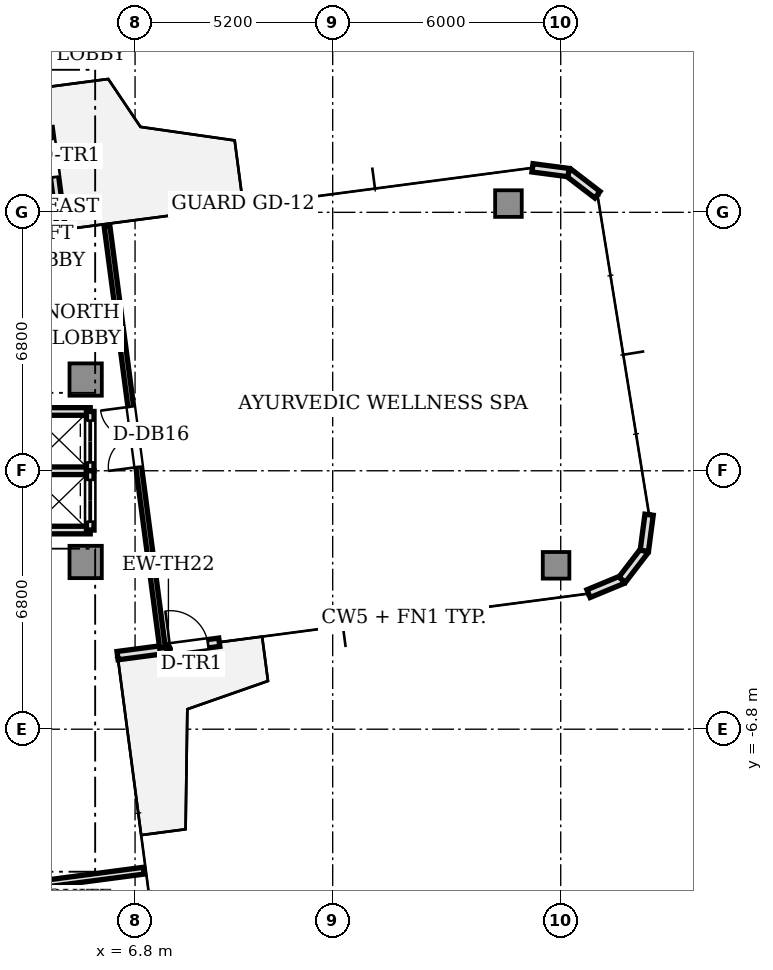
"""IFC4 building model, lengths in metres.
Left out: names, types, materials, properties, quantities, classifications, styles, units other than length and angle.
Written with IfcOpenShell. Run it as: python <this file> out.ifc"""

import sys

from ifc_helpers import new_model, si_unit, direction, frame, frame_2d, origin, origin_2d, place, context, subcontext, project, spatial, rectangle, extrude, source, transform, mapped, element, fill, save


model = new_model("IFC4")
c1 = context("Model", 3, precision=1e-05, world=origin(), true_north=direction((0.0, 1.0)))
c2 = subcontext(c1, "Body", "Model", "MODEL_VIEW")
j1 = project(units=[si_unit("LENGTHUNIT", "METRE"), si_unit("PLANEANGLEUNIT", "RADIAN")], contexts=[c1])
p1 = place(None, origin())
s1 = spatial("IfcSite", under=j1, at=p1, CompositionType="ELEMENT")
p2 = place(p1, origin())
s2 = spatial("IfcBuilding", under=s1, at=p2, CompositionType="ELEMENT")
p3 = place(p2, frame((0.0, 0.0, 213.2)))
s3 = spatial("IfcBuildingStorey", under=s2, at=p3, CompositionType="ELEMENT", Elevation=213.2)
m1 = source(origin(), c2, "Body", "SweptSolid", [
    extrude(rectangle(XDim=0.85, YDim=0.85, at=origin_2d()), origin(), (0.0, 0.0, 1.0), 3.11),
])
for number, where, z_axis, x_axis in (
    (1, (5.5, 2.4, 0.0), (0.0, 0.0, 1.0), (1.0, 0.0, 0.0)),
    (2, (5.5, -2.4, 0.0), (0.0, 0.0, 1.0), (1.0, 0.0, 0.0)),
):
    element("IfcColumn", number, at=place(p3, frame(where, z_axis=z_axis, x_axis=x_axis)), inside=s3, PredefinedType="COLUMN", context=c2, shape_type="MappedRepresentation", body=[
        mapped(m1, transform((0.0, 0.0, 0.0), scale=1.0)),
    ])
m2 = source(origin(), c2, "Body", "SweptSolid", [
    extrude(rectangle(XDim=0.7, YDim=0.7, at=origin_2d()), origin(), (0.0, 0.0, 1.0), 3.11),
])
for number, where, z_axis, x_axis in (
    (3, (17.878, -2.488, 0.0), (0.0, 0.0, 1.0), (1.0, 0.0, 0.0)),
    (4, (16.625, 7.03, 0.0), (0.0, 0.0, 1.0), (1.0, 0.0, 0.0)),
):
    element("IfcColumn", number, at=place(p3, frame(where, z_axis=z_axis, x_axis=x_axis)), inside=s3, PredefinedType="COLUMN", context=c2, shape_type="MappedRepresentation", body=[
        mapped(m2, transform((0.0, 0.0, 0.0), scale=1.0)),
    ])
p4 = place(p3, frame((6.339, -4.864, 0.0), z_axis=(0.0, 0.0, 1.0), x_axis=(0.991439824936, 0.130564442062, 0.0)))
e5 = element("IfcWall", 5, at=p4, inside=s3, PredefinedType="STANDARD", context=c2, shape_type="SweptSolid", body=[
    extrude(rectangle(XDim=2.7, YDim=0.22, at=frame_2d((1.35, 0.0))), origin(), (0.0, 0.0, 1.0), 3.11),
])
p5 = place(p4, frame((1.4, 0.0, 0.0)))
e6 = element("IfcOpeningElement", 6, at=p5, cuts=e5, PredefinedType="OPENING", context=c2, shape_type="SweptSolid", body=[
    extrude(rectangle(XDim=1.0, YDim=2.2, at=frame_2d((0.5, 1.1))), frame((0.0, 0.12, 0.0), z_axis=(0.0, -1.0, 0.0), x_axis=(1.0, 0.0, 0.0)), (0.0, 0.0, 1.0), 0.24),
])
for number, where, z_axis, x_axis in (
    (7, (18.732, -3.233, 0.0), (0.0, 0.0, 1.0), (0.924, 0.383, 0.0)),
    (8, (19.617, -2.866, 0.0), (0.0, 0.0, 1.0), (0.609, 0.793, 0.0)),
    (9, (20.2, -2.106, 0.0), (0.0, 0.0, 1.0), (0.131, 0.991, 0.0)),
):
    element("IfcWall", number, at=place(p3, frame(where, z_axis=z_axis, x_axis=x_axis)), inside=s3, PredefinedType="STANDARD", context=c2, shape_type="SweptSolid", body=[
        extrude(rectangle(XDim=0.958, YDim=0.22, at=frame_2d((0.479, 0.0))), origin(), (0.0, 0.0, 1.0), 3.11),
    ])
p6 = place(p3, frame((18.966, 7.263, 0.0), z_axis=(0.0, 0.0, 1.0), x_axis=(-0.793249178392, 0.608897151398, 0.0)))
e10 = element("IfcWall", 10, at=p6, inside=s3, PredefinedType="STANDARD", context=c2, shape_type="SweptSolid", body=[
    extrude(rectangle(XDim=0.958, YDim=0.22, at=frame_2d((0.479, 0.0))), origin(), (0.0, 0.0, 1.0), 3.11),
])
p7 = place(p3, frame((18.207, 7.846, 0.0), z_axis=(0.0, 0.0, 1.0), x_axis=(-0.991444747987, 0.130527053476, 0.0)))
e11 = element("IfcWall", 11, at=p7, inside=s3, PredefinedType="STANDARD", context=c2, shape_type="SweptSolid", body=[
    extrude(rectangle(XDim=0.958, YDim=0.22, at=frame_2d((0.479, 0.0))), origin(), (0.0, 0.0, 1.0), 3.11),
])
p8 = place(p3, frame((4.864, 6.339, 0.0), z_axis=(0.0, 0.0, 1.0), x_axis=(-0.130564442062, 0.991439824936, 0.0)))
e12 = element("IfcWall", 12, at=p8, inside=s3, PredefinedType="STANDARD", context=c2, shape_type="SweptSolid", body=[
    extrude(rectangle(XDim=2.7, YDim=0.22, at=frame_2d((1.35, 0.0))), origin(), (0.0, 0.0, 1.0), 3.11),
])
p9 = place(p8, frame((1.4, 0.0, 0.0)))
e13 = element("IfcOpeningElement", 13, at=p9, cuts=e12, PredefinedType="OPENING", context=c2, shape_type="SweptSolid", body=[
    extrude(rectangle(XDim=1.0, YDim=2.2, at=frame_2d((0.5, 1.1))), frame((0.0, 0.12, 0.0), z_axis=(0.0, -1.0, 0.0), x_axis=(1.0, 0.0, 0.0)), (0.0, 0.0, 1.0), 0.24),
])
for number, where, z_axis, x_axis in (
    (14, (3.98, 1.56, 0.0), (0.0, 0.0, 1.0), (1.0, 0.0, 0.0)),
    (15, (3.98, -1.56, 0.0), (0.0, 0.0, 1.0), (1.0, 0.0, 0.0)),
    (16, (3.98, 0.0, 0.0), (0.0, 0.0, 1.0), (1.0, 0.0, 0.0)),
):
    element("IfcWall", number, at=place(p3, frame(where, z_axis=z_axis, x_axis=x_axis)), inside=s3, PredefinedType="SOLIDWALL", context=c2, shape_type="SweptSolid", body=[
        extrude(rectangle(XDim=1.64, YDim=0.2, at=frame_2d((0.82, 0.0))), origin(), (0.0, 0.0, 1.0), 2.66),
    ])
p10 = place(p3, frame((5.62, 0.0, 0.0), z_axis=(0.0, 0.0, 1.0), x_axis=(0.0, 1.0, 0.0)))
e17 = element("IfcWall", 17, at=p10, inside=s3, PredefinedType="SOLIDWALL", context=c2, shape_type="SweptSolid", body=[
    extrude(rectangle(XDim=1.56, YDim=0.2, at=frame_2d((0.78, 0.0))), origin(), (0.0, 0.0, 1.0), 2.66),
])
p11 = place(p10, frame((0.22, 0.0, 0.0)))
e18 = element("IfcOpeningElement", 18, at=p11, cuts=e17, PredefinedType="OPENING", context=c2, shape_type="SweptSolid", body=[
    extrude(rectangle(XDim=1.1, YDim=2.2, at=frame_2d((0.55, 1.1))), frame((0.0, 0.11, 0.0), z_axis=(0.0, -1.0, 0.0), x_axis=(1.0, 0.0, 0.0)), (0.0, 0.0, 1.0), 0.22),
])
p12 = place(p3, frame((5.62, -1.56, 0.0), z_axis=(0.0, 0.0, 1.0), x_axis=(0.0, 1.0, 0.0)))
e19 = element("IfcWall", 19, at=p12, inside=s3, PredefinedType="SOLIDWALL", context=c2, shape_type="SweptSolid", body=[
    extrude(rectangle(XDim=1.56, YDim=0.2, at=frame_2d((0.78, 0.0))), origin(), (0.0, 0.0, 1.0), 2.66),
])
p13 = place(p12, frame((0.22, 0.0, 0.0)))
e20 = element("IfcOpeningElement", 20, at=p13, cuts=e19, PredefinedType="OPENING", context=c2, shape_type="SweptSolid", body=[
    extrude(rectangle(XDim=1.1, YDim=2.2, at=frame_2d((0.55, 1.1))), frame((0.0, 0.11, 0.0), z_axis=(0.0, -1.0, 0.0), x_axis=(1.0, 0.0, 0.0)), (0.0, 0.0, 1.0), 0.22),
])
p14 = place(p3, frame((7.522, -4.658, 0.0), z_axis=(0.0, 0.0, 1.0), x_axis=(-0.130505824974, 0.99144754256, 0.0)))
e21 = element("IfcWall", 21, at=p14, inside=s3, PredefinedType="PARTITIONING", context=c2, shape_type="SweptSolid", body=[
    extrude(rectangle(XDim=11.2, YDim=0.15, at=frame_2d((5.6, 0.0))), origin(), (0.0, 0.0, 1.0), 2.66),
])
p15 = place(p14, frame((4.8, 0.0, 0.0)))
e22 = element("IfcOpeningElement", 22, at=p15, cuts=e21, PredefinedType="OPENING", context=c2, shape_type="SweptSolid", body=[
    extrude(rectangle(XDim=1.6, YDim=2.25, at=frame_2d((0.8, 1.125))), frame((0.0, 0.085, 0.0), z_axis=(0.0, -1.0, 0.0), x_axis=(1.0, 0.0, 0.0)), (0.0, 0.0, 1.0), 0.17),
])
p16 = place(p3, frame((2.423, -11.129, 0.0), z_axis=(0.0, 0.0, 1.0), x_axis=(0.991445715827, 0.13051970184, 0.0)))
e23 = element("IfcWall", 23, at=p16, inside=s3, PredefinedType="PARTITIONING", context=c2, shape_type="SweptSolid", body=[
    extrude(rectangle(XDim=4.65, YDim=0.18, at=frame_2d((2.325, 0.0))), origin(), (0.0, 0.0, 1.0), 2.66),
])
m3 = source(origin(), c2, "Body", "SweptSolid", [
    extrude(rectangle(XDim=1.0, YDim=0.05, at=origin_2d()), origin(), (0.0, 0.0, 1.0), 2.2),
])
p17 = place(p5, frame((0.5, 0.0, 0.0)))
e24 = element("IfcDoor", 24, at=p17, inside=s3, OperationType="SINGLE_SWING_LEFT", PredefinedType="DOOR", context=c2, shape_type="MappedRepresentation", body=[
    mapped(m3, transform((0.0, 0.0, 0.0), scale=1.0)),
])
fill(e6, e24)
p18 = place(p9, frame((0.5, 0.0, 0.0)))
e25 = element("IfcDoor", 25, at=p18, inside=s3, OperationType="SINGLE_SWING_LEFT", PredefinedType="DOOR", context=c2, shape_type="MappedRepresentation", body=[
    mapped(m3, transform((0.0, 0.0, 0.0), scale=1.0)),
])
fill(e13, e25)
m4 = source(origin(), c2, "Body", "SweptSolid", [
    extrude(rectangle(XDim=1.1, YDim=0.05, at=origin_2d()), origin(), (0.0, 0.0, 1.0), 2.2),
])
p19 = place(p11, frame((0.55, 0.0, 0.0)))
e26 = element("IfcDoor", 26, at=p19, inside=s3, OperationType="DOUBLE_DOOR_SLIDING", PredefinedType="DOOR", context=c2, shape_type="MappedRepresentation", body=[
    mapped(m4, transform((0.0, 0.0, 0.0), scale=1.0)),
])
fill(e18, e26)
p20 = place(p13, frame((0.55, 0.0, 0.0)))
e27 = element("IfcDoor", 27, at=p20, inside=s3, OperationType="DOUBLE_DOOR_SLIDING", PredefinedType="DOOR", context=c2, shape_type="MappedRepresentation", body=[
    mapped(m4, transform((0.0, 0.0, 0.0), scale=1.0)),
])
fill(e20, e27)
m5 = source(origin(), c2, "Body", "SweptSolid", [
    extrude(rectangle(XDim=1.6, YDim=0.05, at=origin_2d()), origin(), (0.0, 0.0, 1.0), 2.25),
])
p21 = place(p15, frame((0.8, 0.0, 0.0)))
e28 = element("IfcDoor", 28, at=p21, inside=s3, OperationType="DOUBLE_DOOR_SINGLE_SWING", PredefinedType="DOOR", context=c2, shape_type="MappedRepresentation", body=[
    mapped(m5, transform((0.0, 0.0, 0.0), scale=1.0)),
])
fill(e22, e28)
save(model, sys.argv[1])
